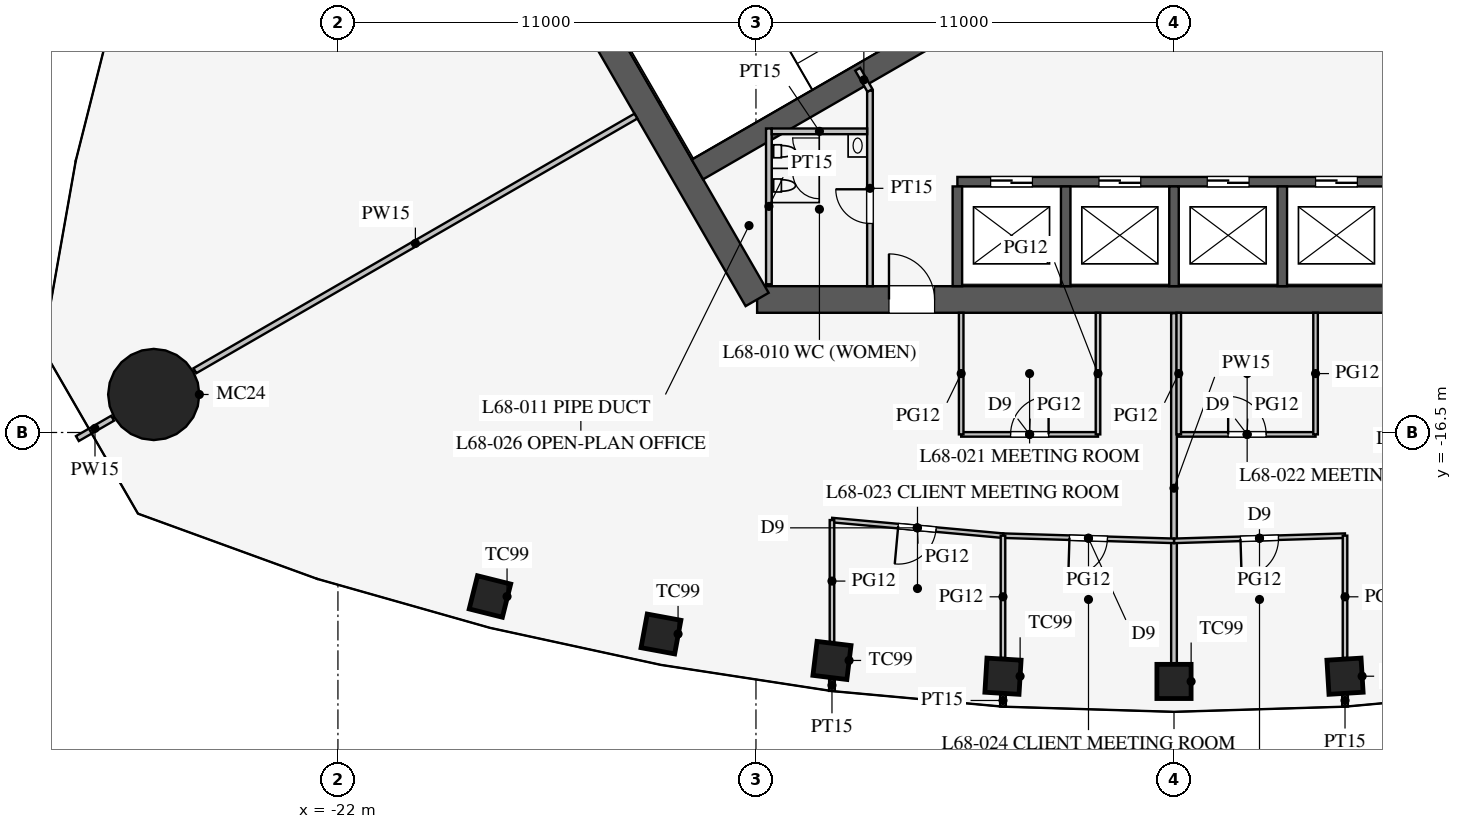
"""IFC4 building model, lengths in metres.
Left out: names, types, materials, properties, quantities, classifications, styles, units other than length and angle.
Written with IfcOpenShell. Run it as: python <this file> out.ifc"""

import sys

from ifc_helpers import new_model, si_unit, direction, frame, frame_2d, origin, origin_2d, place, context, subcontext, project, spatial, rectangle, circle, extrude, element, fill, save


model = new_model("IFC4")
c1 = context("Model", 3, precision=1e-05, world=origin(), true_north=direction((0.0, 1.0)))
c2 = subcontext(c1, "Body", "Model", "MODEL_VIEW")
j1 = project(units=[si_unit("LENGTHUNIT", "METRE"), si_unit("PLANEANGLEUNIT", "RADIAN")], contexts=[c1])
p1 = place(None, origin())
s1 = spatial("IfcSite", under=j1, at=p1, CompositionType="ELEMENT")
p2 = place(p1, origin())
s2 = spatial("IfcBuilding", under=s1, at=p2, CompositionType="ELEMENT")
p3 = place(p2, frame((0.0, 0.0, 297.3)))
s3 = spatial("IfcBuildingStorey", under=s2, at=p3, CompositionType="ELEMENT", Elevation=297.3)
for number, where, z_axis, x_axis in (
    (1, (-18.0, -20.816, 0.0), (0.0, 0.0, 1.0), (0.97, -0.242, 0.0)),
    (2, (-13.5, -21.803, 0.0), (0.0, 0.0, 1.0), (0.983, -0.182, 0.0)),
    (3, (-9.0, -22.499, 0.0), (0.0, 0.0, 1.0), (0.993, -0.121, 0.0)),
    (4, (-4.5, -22.914, 0.0), (0.0, 0.0, 1.0), (0.998, -0.061, 0.0)),
    (5, (0.0, -23.052, 0.0), (0.0, 0.0, 1.0), (1.0, 0.0, 0.0)),
    (6, (4.5, -22.914, 0.0), (0.0, 0.0, 1.0), (0.998, 0.061, 0.0)),
):
    element("IfcColumn", number, at=place(p3, frame(where, z_axis=z_axis, x_axis=x_axis)), inside=s3, PredefinedType="COLUMN", context=c2, shape_type="SweptSolid", body=[
        extrude(rectangle(XDim=0.9, YDim=0.9, at=origin_2d()), origin(), (0.0, 0.0, 1.0), 4.2),
    ])
p4 = place(p3, frame((-26.847, -15.5, 0.0), z_axis=(0.0, 0.0, 1.0), x_axis=(1.0, 0.0, 0.0)))
e7 = element("IfcColumn", 7, at=p4, inside=s3, PredefinedType="COLUMN", context=c2, shape_type="SweptSolid", body=[
    extrude(circle(Radius=1.2, at=origin_2d()), origin(), (0.0, 0.0, 1.0), 4.2),
])
p5 = place(p3, frame((-10.97, -13.0, 0.0), z_axis=(0.0, 0.0, 1.0), x_axis=(1.0, 0.0, 0.0)))
e8 = element("IfcWall", 8, at=p5, inside=s3, PredefinedType="SHEAR", context=c2, shape_type="SweptSolid", body=[
    extrude(rectangle(XDim=21.939, YDim=0.7, at=frame_2d((10.97, 0.0))), origin(), (0.0, 0.0, 1.0), 4.2),
])
p6 = place(p5, frame((17.27, 0.0, 0.0)))
e9 = element("IfcOpeningElement", 9, at=p6, cuts=e8, PredefinedType="OPENING", context=c2, shape_type="SweptSolid", body=[
    extrude(rectangle(XDim=1.2, YDim=2.1, at=frame_2d((0.6, 1.05))), frame((0.0, 0.36, 0.0), z_axis=(0.0, -1.0, 0.0), x_axis=(1.0, 0.0, 0.0)), (0.0, 0.0, 1.0), 0.72),
])
p7 = place(p5, frame((3.47, 0.0, 0.0)))
e10 = element("IfcOpeningElement", 10, at=p7, cuts=e8, PredefinedType="OPENING", context=c2, shape_type="SweptSolid", body=[
    extrude(rectangle(XDim=1.2, YDim=2.1, at=frame_2d((0.6, 1.05))), frame((0.0, 0.36, 0.0), z_axis=(0.0, -1.0, 0.0), x_axis=(1.0, 0.0, 0.0)), (0.0, 0.0, 1.0), 0.72),
])
p8 = place(p3, frame((-16.743, -3.0, 0.0), z_axis=(0.0, 0.0, 1.0), x_axis=(0.499995765644, -0.866027848477, 0.0)))
e11 = element("IfcWall", 11, at=p8, inside=s3, PredefinedType="SHEAR", context=c2, shape_type="SweptSolid", body=[
    extrude(rectangle(XDim=11.547, YDim=0.7, at=frame_2d((5.773, 0.0))), origin(), (0.0, 0.0, 1.0), 4.2),
])
p9 = place(p3, frame((-5.7, -9.9, 0.0), z_axis=(0.0, 0.0, 1.0), x_axis=(1.0, 0.0, 0.0)))
e12 = element("IfcWall", 12, at=p9, inside=s3, PredefinedType="SHEAR", context=c2, shape_type="SweptSolid", body=[
    extrude(rectangle(XDim=11.4, YDim=0.25, at=frame_2d((5.7, 0.0))), origin(), (0.0, 0.0, 1.0), 4.2),
])
p10 = place(p9, frame((0.875, 0.0, 0.0)))
e13 = element("IfcOpeningElement", 13, at=p10, cuts=e12, PredefinedType="OPENING", context=c2, shape_type="SweptSolid", body=[
    extrude(rectangle(XDim=1.1, YDim=2.2, at=frame_2d((0.55, 1.1))), frame((0.0, 0.135, 0.0), z_axis=(0.0, -1.0, 0.0), x_axis=(1.0, 0.0, 0.0)), (0.0, 0.0, 1.0), 0.27),
])
p11 = place(p9, frame((3.725, 0.0, 0.0)))
e14 = element("IfcOpeningElement", 14, at=p11, cuts=e12, PredefinedType="OPENING", context=c2, shape_type="SweptSolid", body=[
    extrude(rectangle(XDim=1.1, YDim=2.2, at=frame_2d((0.55, 1.1))), frame((0.0, 0.135, 0.0), z_axis=(0.0, -1.0, 0.0), x_axis=(1.0, 0.0, 0.0)), (0.0, 0.0, 1.0), 0.27),
])
p12 = place(p9, frame((6.575, 0.0, 0.0)))
e15 = element("IfcOpeningElement", 15, at=p12, cuts=e12, PredefinedType="OPENING", context=c2, shape_type="SweptSolid", body=[
    extrude(rectangle(XDim=1.1, YDim=2.2, at=frame_2d((0.55, 1.1))), frame((0.0, 0.135, 0.0), z_axis=(0.0, -1.0, 0.0), x_axis=(1.0, 0.0, 0.0)), (0.0, 0.0, 1.0), 0.27),
])
p13 = place(p9, frame((9.425, 0.0, 0.0)))
e16 = element("IfcOpeningElement", 16, at=p13, cuts=e12, PredefinedType="OPENING", context=c2, shape_type="SweptSolid", body=[
    extrude(rectangle(XDim=1.1, YDim=2.2, at=frame_2d((0.55, 1.1))), frame((0.0, 0.135, 0.0), z_axis=(0.0, -1.0, 0.0), x_axis=(1.0, 0.0, 0.0)), (0.0, 0.0, 1.0), 0.27),
])
for number, where, z_axis, x_axis in (
    (17, (-5.7, -10.025, 0.0), (0.0, 0.0, 1.0), (0.0, -1.0, 0.0)),
    (18, (-2.85, -10.025, 0.0), (0.0, 0.0, 1.0), (0.0, -1.0, 0.0)),
    (19, (0.0, -10.025, 0.0), (0.0, 0.0, 1.0), (0.0, -1.0, 0.0)),
    (20, (2.85, -10.025, 0.0), (0.0, 0.0, 1.0), (0.0, -1.0, 0.0)),
):
    element("IfcWall", number, at=place(p3, frame(where, z_axis=z_axis, x_axis=x_axis)), inside=s3, PredefinedType="SHEAR", context=c2, shape_type="SweptSolid", body=[
        extrude(rectangle(XDim=2.625, YDim=0.25, at=frame_2d((1.312, 0.0))), origin(), (0.0, 0.0, 1.0), 4.2),
    ])
for number, where, z_axis, x_axis in (
    (21, (4.638, -5.016, 0.0), (0.0, 0.0, 1.0), (0.866, -0.5, 0.0)),
    (22, (-4.638, -5.016, 0.0), (0.0, 0.0, 1.0), (-0.866, -0.5, 0.0)),
):
    element("IfcWall", number, at=place(p3, frame(where, z_axis=z_axis, x_axis=x_axis)), inside=s3, PredefinedType="SHEAR", context=c2, shape_type="SweptSolid", body=[
        extrude(rectangle(XDim=9.125, YDim=0.6, at=frame_2d((4.562, 0.0))), origin(), (0.0, 0.0, 1.0), 4.2),
    ])
p14 = place(p3, frame((-8.0, -7.5, 0.0), z_axis=(0.0, 0.0, 1.0), x_axis=(0.0, -1.0, 0.0)))
e23 = element("IfcWall", 23, at=p14, inside=s3, PredefinedType="PARTITIONING", context=c2, shape_type="SweptSolid", body=[
    extrude(rectangle(XDim=5.15, YDim=0.15, at=frame_2d((2.575, 0.0))), origin(), (0.0, 0.0, 1.0), 4.0),
])
p15 = place(p14, frame((2.6, 0.0, 0.0)))
e24 = element("IfcOpeningElement", 24, at=p15, cuts=e23, PredefinedType="OPENING", context=c2, shape_type="SweptSolid", body=[
    extrude(rectangle(XDim=0.9, YDim=2.1, at=frame_2d((0.45, 1.05))), frame((0.0, 0.085, 0.0), z_axis=(0.0, -1.0, 0.0), x_axis=(1.0, 0.0, 0.0)), (0.0, 0.0, 1.0), 0.17),
])
p16 = place(p3, frame((-8.0, -7.5, 0.0), z_axis=(0.0, 0.0, 1.0), x_axis=(-0.499842556608, 0.866116284689, 0.0)))
e25 = element("IfcWall", 25, at=p16, inside=s3, PredefinedType="PARTITIONING", context=c2, shape_type="SweptSolid", body=[
    extrude(rectangle(XDim=0.645, YDim=0.15, at=frame_2d((0.323, 0.0))), origin(), (0.0, 0.0, 1.0), 4.0),
])
p17 = place(p3, frame((-10.66, -8.5, 0.0), z_axis=(0.0, 0.0, 1.0), x_axis=(0.0, -1.0, 0.0)))
e26 = element("IfcWall", 26, at=p17, inside=s3, PredefinedType="PARTITIONING", context=c2, shape_type="SweptSolid", body=[
    extrude(rectangle(XDim=4.1, YDim=0.15, at=frame_2d((2.05, 0.0))), origin(), (0.0, 0.0, 1.0), 4.0),
])
p18 = place(p3, frame((-8.075, -8.575, 0.0), z_axis=(0.0, 0.0, 1.0), x_axis=(-1.0, 0.0, 0.0)))
e27 = element("IfcWall", 27, at=p18, inside=s3, PredefinedType="PARTITIONING", context=c2, shape_type="SweptSolid", body=[
    extrude(rectangle(XDim=2.51, YDim=0.15, at=frame_2d((1.255, 0.0))), origin(), (0.0, 0.0, 1.0), 4.0),
])
p19 = place(p3, frame((-14.159, -8.175, 0.0), z_axis=(0.0, 0.0, 1.0), x_axis=(-0.866026905467, -0.499997399001, 0.0)))
e28 = element("IfcWall", 28, at=p19, inside=s3, PredefinedType="PARTITIONING", context=c2, shape_type="SweptSolid", body=[
    extrude(rectangle(XDim=13.4, YDim=0.15, at=frame_2d((6.7, 0.0))), origin(), (0.0, 0.0, 1.0), 2.5),
])
p20 = place(p3, frame((-27.929, -16.125, 0.0), z_axis=(0.0, 0.0, 1.0), x_axis=(-0.866086810508, -0.499893625349, 0.0)))
e29 = element("IfcWall", 29, at=p20, inside=s3, PredefinedType="PARTITIONING", context=c2, shape_type="SweptSolid", body=[
    extrude(rectangle(XDim=1.07, YDim=0.15, at=frame_2d((0.535, 0.0))), origin(), (0.0, 0.0, 1.0), 2.5),
])
p21 = place(p3, frame((0.0, -13.36, 0.0), z_axis=(0.0, 0.0, 1.0), x_axis=(0.0, -1.0, 0.0)))
e30 = element("IfcWall", 30, at=p21, inside=s3, PredefinedType="PARTITIONING", context=c2, shape_type="SweptSolid", body=[
    extrude(rectangle(XDim=9.211, YDim=0.15, at=frame_2d((4.606, 0.0))), origin(), (0.0, 0.0, 1.0), 3.3),
])
p22 = place(p3, frame((0.125, -16.55, 0.0), z_axis=(0.0, 0.0, 1.0), x_axis=(1.0, 0.0, 0.0)))
e31 = element("IfcWall", 31, at=p22, inside=s3, PredefinedType="PARTITIONING", context=c2, shape_type="SweptSolid", body=[
    extrude(rectangle(XDim=3.6, YDim=0.12, at=frame_2d((1.8, 0.0))), origin(), (0.0, 0.0, 1.0), 2.9),
])
p23 = place(p22, frame((1.3, 0.0, 0.15)))
e32 = element("IfcOpeningElement", 32, at=p23, cuts=e31, PredefinedType="OPENING", context=c2, shape_type="SweptSolid", body=[
    extrude(rectangle(XDim=1.0, YDim=2.1, at=frame_2d((0.5, 1.05))), frame((0.0, 0.07, 0.0), z_axis=(0.0, -1.0, 0.0), x_axis=(1.0, 0.0, 0.0)), (0.0, 0.0, 1.0), 0.14),
])
p24 = place(p3, frame((-5.6, -16.55, 0.0), z_axis=(0.0, 0.0, 1.0), x_axis=(1.0, 0.0, 0.0)))
e33 = element("IfcWall", 33, at=p24, inside=s3, PredefinedType="PARTITIONING", context=c2, shape_type="SweptSolid", body=[
    extrude(rectangle(XDim=3.6, YDim=0.12, at=frame_2d((1.8, 0.0))), origin(), (0.0, 0.0, 1.0), 2.9),
])
p25 = place(p24, frame((1.3, 0.0, 0.15)))
e34 = element("IfcOpeningElement", 34, at=p25, cuts=e33, PredefinedType="OPENING", context=c2, shape_type="SweptSolid", body=[
    extrude(rectangle(XDim=1.0, YDim=2.1, at=frame_2d((0.5, 1.05))), frame((0.0, 0.07, 0.0), z_axis=(0.0, -1.0, 0.0), x_axis=(1.0, 0.0, 0.0)), (0.0, 0.0, 1.0), 0.14),
])
for number, where, z_axis, x_axis in (
    (35, (0.125, -13.35, 0.0), (0.0, 0.0, 1.0), (0.0, -1.0, 0.0)),
    (36, (3.725, -13.35, 0.0), (0.0, 0.0, 1.0), (0.0, -1.0, 0.0)),
    (37, (-2.0, -13.35, 0.0), (0.0, 0.0, 1.0), (0.0, -1.0, 0.0)),
    (38, (-5.6, -13.35, 0.0), (0.0, 0.0, 1.0), (0.0, -1.0, 0.0)),
):
    element("IfcWall", number, at=place(p3, frame(where, z_axis=z_axis, x_axis=x_axis)), inside=s3, PredefinedType="PARTITIONING", context=c2, shape_type="SweptSolid", body=[
        extrude(rectangle(XDim=3.2, YDim=0.12, at=frame_2d((1.6, 0.0))), origin(), (0.0, 0.0, 1.0), 2.9),
    ])
for number, where, z_axis, x_axis in (
    (39, (4.5, -23.394, 0.0), (0.0, 0.0, 1.0), (0.0, -1.0, 0.0)),
    (40, (-4.5, -23.394, 0.0), (0.0, 0.0, 1.0), (0.0, -1.0, 0.0)),
):
    element("IfcWall", number, at=place(p3, frame(where, z_axis=z_axis, x_axis=x_axis)), inside=s3, PredefinedType="PARTITIONING", context=c2, shape_type="SweptSolid", body=[
        extrude(rectangle(XDim=0.316, YDim=0.15, at=frame_2d((0.158, 0.0))), origin(), (0.0, 0.0, 1.0), 2.9),
    ])
p26 = place(p3, frame((-9.0, -23.004, 0.0), z_axis=(0.0, 0.0, 1.0), x_axis=(0.0, -1.0, 0.0)))
e41 = element("IfcWall", 41, at=p26, inside=s3, PredefinedType="PARTITIONING", context=c2, shape_type="SweptSolid", body=[
    extrude(rectangle(XDim=0.296, YDim=0.15, at=frame_2d((0.148, 0.0))), origin(), (0.0, 0.0, 1.0), 2.9),
])
p27 = place(p3, frame((0.0, -19.352, 0.0), z_axis=(0.0, 0.0, 1.0), x_axis=(0.999542074227, 0.030259574513, 0.0)))
e42 = element("IfcWall", 42, at=p27, inside=s3, PredefinedType="PARTITIONING", context=c2, shape_type="SweptSolid", body=[
    extrude(rectangle(XDim=4.502, YDim=0.12, at=frame_2d((2.251, 0.0))), origin(), (0.0, 0.0, 1.0), 2.9),
])
p28 = place(p27, frame((1.75, 0.0, 0.15)))
e43 = element("IfcOpeningElement", 43, at=p28, cuts=e42, PredefinedType="OPENING", context=c2, shape_type="SweptSolid", body=[
    extrude(rectangle(XDim=1.0, YDim=2.1, at=frame_2d((0.5, 1.05))), frame((0.0, 0.07, 0.0), z_axis=(0.0, -1.0, 0.0), x_axis=(1.0, 0.0, 0.0)), (0.0, 0.0, 1.0), 0.14),
])
p29 = place(p3, frame((-4.5, -19.215, 0.0), z_axis=(0.0, 0.0, 1.0), x_axis=(0.999542074227, -0.030259574513, 0.0)))
e44 = element("IfcWall", 44, at=p29, inside=s3, PredefinedType="PARTITIONING", context=c2, shape_type="SweptSolid", body=[
    extrude(rectangle(XDim=4.502, YDim=0.12, at=frame_2d((2.251, 0.0))), origin(), (0.0, 0.0, 1.0), 2.9),
])
p30 = place(p29, frame((1.75, 0.0, 0.15)))
e45 = element("IfcOpeningElement", 45, at=p30, cuts=e44, PredefinedType="OPENING", context=c2, shape_type="SweptSolid", body=[
    extrude(rectangle(XDim=1.0, YDim=2.1, at=frame_2d((0.5, 1.05))), frame((0.0, 0.07, 0.0), z_axis=(0.0, -1.0, 0.0), x_axis=(1.0, 0.0, 0.0)), (0.0, 0.0, 1.0), 0.14),
])
p31 = place(p3, frame((-9.0, -18.805, 0.0), z_axis=(0.0, 0.0, 1.0), x_axis=(0.995871921504, -0.090769576179, 0.0)))
e46 = element("IfcWall", 46, at=p31, inside=s3, PredefinedType="PARTITIONING", context=c2, shape_type="SweptSolid", body=[
    extrude(rectangle(XDim=4.519, YDim=0.12, at=frame_2d((2.259, 0.0))), origin(), (0.0, 0.0, 1.0), 2.9),
])
p32 = place(p31, frame((1.75, 0.0, 0.15)))
e47 = element("IfcOpeningElement", 47, at=p32, cuts=e46, PredefinedType="OPENING", context=c2, shape_type="SweptSolid", body=[
    extrude(rectangle(XDim=1.0, YDim=2.1, at=frame_2d((0.5, 1.05))), frame((0.0, 0.07, 0.0), z_axis=(0.0, -1.0, 0.0), x_axis=(1.0, 0.0, 0.0)), (0.0, 0.0, 1.0), 0.14),
])
for number, where, z_axis, x_axis in (
    (48, (4.5, -19.215, 0.0), (0.0, 0.0, 1.0), (0.0, -1.0, 0.0)),
    (49, (-4.5, -19.215, 0.0), (0.0, 0.0, 1.0), (0.0, -1.0, 0.0)),
):
    element("IfcWall", number, at=place(p3, frame(where, z_axis=z_axis, x_axis=x_axis)), inside=s3, PredefinedType="PARTITIONING", context=c2, shape_type="SweptSolid", body=[
        extrude(rectangle(XDim=3.218, YDim=0.12, at=frame_2d((1.609, 0.0))), origin(), (0.0, 0.0, 1.0), 2.9),
    ])
p33 = place(p3, frame((-9.0, -18.805, 0.0), z_axis=(0.0, 0.0, 1.0), x_axis=(0.0, -1.0, 0.0)))
e50 = element("IfcWall", 50, at=p33, inside=s3, PredefinedType="PARTITIONING", context=c2, shape_type="SweptSolid", body=[
    extrude(rectangle(XDim=3.21, YDim=0.12, at=frame_2d((1.605, 0.0))), origin(), (0.0, 0.0, 1.0), 2.9),
])
p34 = place(p15, frame((0.9, 0.0, 0.0), z_axis=(0.0, 0.0, 1.0), x_axis=(-1.0, 0.0, 0.0)))
e51 = element("IfcDoor", 51, at=p34, inside=s3, OperationType="SINGLE_SWING_RIGHT", PredefinedType="DOOR", context=c2, shape_type="SweptSolid", body=[
    extrude(rectangle(XDim=0.9, YDim=2.1, at=frame_2d((0.45, 1.05))), frame((0.0, 0.025, 0.0), z_axis=(0.0, -1.0, 0.0), x_axis=(1.0, 0.0, 0.0)), (0.0, 0.0, 1.0), 0.05),
])
fill(e24, e51)
p35 = place(p7, origin())
e52 = element("IfcDoor", 52, at=p35, inside=s3, OperationType="SINGLE_SWING_LEFT", PredefinedType="DOOR", context=c2, shape_type="SweptSolid", body=[
    extrude(rectangle(XDim=1.2, YDim=2.1, at=frame_2d((0.6, 1.05))), frame((0.0, 0.025, 0.0), z_axis=(0.0, -1.0, 0.0), x_axis=(1.0, 0.0, 0.0)), (0.0, 0.0, 1.0), 0.05),
])
fill(e10, e52)
p36 = place(p25, origin())
e53 = element("IfcDoor", 53, at=p36, inside=s3, OperationType="SINGLE_SWING_RIGHT", PredefinedType="DOOR", context=c2, shape_type="SweptSolid", body=[
    extrude(rectangle(XDim=1.0, YDim=2.1, at=frame_2d((0.5, 1.05))), frame((0.0, 0.025, 0.0), z_axis=(0.0, -1.0, 0.0), x_axis=(1.0, 0.0, 0.0)), (0.0, 0.0, 1.0), 0.05),
])
fill(e34, e53)
p37 = place(p23, origin())
e54 = element("IfcDoor", 54, at=p37, inside=s3, OperationType="SINGLE_SWING_LEFT", PredefinedType="DOOR", context=c2, shape_type="SweptSolid", body=[
    extrude(rectangle(XDim=1.0, YDim=2.1, at=frame_2d((0.5, 1.05))), frame((0.0, 0.025, 0.0), z_axis=(0.0, -1.0, 0.0), x_axis=(1.0, 0.0, 0.0)), (0.0, 0.0, 1.0), 0.05),
])
fill(e32, e54)
p38 = place(p32, frame((1.0, 0.0, 0.0), z_axis=(0.0, 0.0, 1.0), x_axis=(-1.0, 0.0, 0.0)))
e55 = element("IfcDoor", 55, at=p38, inside=s3, OperationType="SINGLE_SWING_RIGHT", PredefinedType="DOOR", context=c2, shape_type="SweptSolid", body=[
    extrude(rectangle(XDim=1.0, YDim=2.1, at=frame_2d((0.5, 1.05))), frame((0.0, 0.025, 0.0), z_axis=(0.0, -1.0, 0.0), x_axis=(1.0, 0.0, 0.0)), (0.0, 0.0, 1.0), 0.05),
])
fill(e47, e55)
p39 = place(p30, frame((1.0, 0.0, 0.0), z_axis=(0.0, 0.0, 1.0), x_axis=(-1.0, 0.0, 0.0)))
e56 = element("IfcDoor", 56, at=p39, inside=s3, OperationType="SINGLE_SWING_RIGHT", PredefinedType="DOOR", context=c2, shape_type="SweptSolid", body=[
    extrude(rectangle(XDim=1.0, YDim=2.1, at=frame_2d((0.5, 1.05))), frame((0.0, 0.025, 0.0), z_axis=(0.0, -1.0, 0.0), x_axis=(1.0, 0.0, 0.0)), (0.0, 0.0, 1.0), 0.05),
])
fill(e45, e56)
p40 = place(p28, frame((1.0, 0.0, 0.0), z_axis=(0.0, 0.0, 1.0), x_axis=(-1.0, 0.0, 0.0)))
e57 = element("IfcDoor", 57, at=p40, inside=s3, OperationType="SINGLE_SWING_RIGHT", PredefinedType="DOOR", context=c2, shape_type="SweptSolid", body=[
    extrude(rectangle(XDim=1.0, YDim=2.1, at=frame_2d((0.5, 1.05))), frame((0.0, 0.025, 0.0), z_axis=(0.0, -1.0, 0.0), x_axis=(1.0, 0.0, 0.0)), (0.0, 0.0, 1.0), 0.05),
])
fill(e43, e57)
p41 = place(p10, origin())
e58 = element("IfcDoor", 58, at=p41, inside=s3, OperationType="DOUBLE_DOOR_SLIDING", PredefinedType="DOOR", context=c2, shape_type="SweptSolid", body=[
    extrude(rectangle(XDim=1.1, YDim=2.2, at=frame_2d((0.55, 1.1))), frame((0.0, 0.025, 0.0), z_axis=(0.0, -1.0, 0.0), x_axis=(1.0, 0.0, 0.0)), (0.0, 0.0, 1.0), 0.05),
])
fill(e13, e58)
p42 = place(p11, origin())
e59 = element("IfcDoor", 59, at=p42, inside=s3, OperationType="DOUBLE_DOOR_SLIDING", PredefinedType="DOOR", context=c2, shape_type="SweptSolid", body=[
    extrude(rectangle(XDim=1.1, YDim=2.2, at=frame_2d((0.55, 1.1))), frame((0.0, 0.025, 0.0), z_axis=(0.0, -1.0, 0.0), x_axis=(1.0, 0.0, 0.0)), (0.0, 0.0, 1.0), 0.05),
])
fill(e14, e59)
p43 = place(p12, origin())
e60 = element("IfcDoor", 60, at=p43, inside=s3, OperationType="DOUBLE_DOOR_SLIDING", PredefinedType="DOOR", context=c2, shape_type="SweptSolid", body=[
    extrude(rectangle(XDim=1.1, YDim=2.2, at=frame_2d((0.55, 1.1))), frame((0.0, 0.025, 0.0), z_axis=(0.0, -1.0, 0.0), x_axis=(1.0, 0.0, 0.0)), (0.0, 0.0, 1.0), 0.05),
])
fill(e15, e60)
p44 = place(p13, origin())
e61 = element("IfcDoor", 61, at=p44, inside=s3, OperationType="DOUBLE_DOOR_SLIDING", PredefinedType="DOOR", context=c2, shape_type="SweptSolid", body=[
    extrude(rectangle(XDim=1.1, YDim=2.2, at=frame_2d((0.55, 1.1))), frame((0.0, 0.025, 0.0), z_axis=(0.0, -1.0, 0.0), x_axis=(1.0, 0.0, 0.0)), (0.0, 0.0, 1.0), 0.05),
])
fill(e16, e61)
save(model, sys.argv[1])
